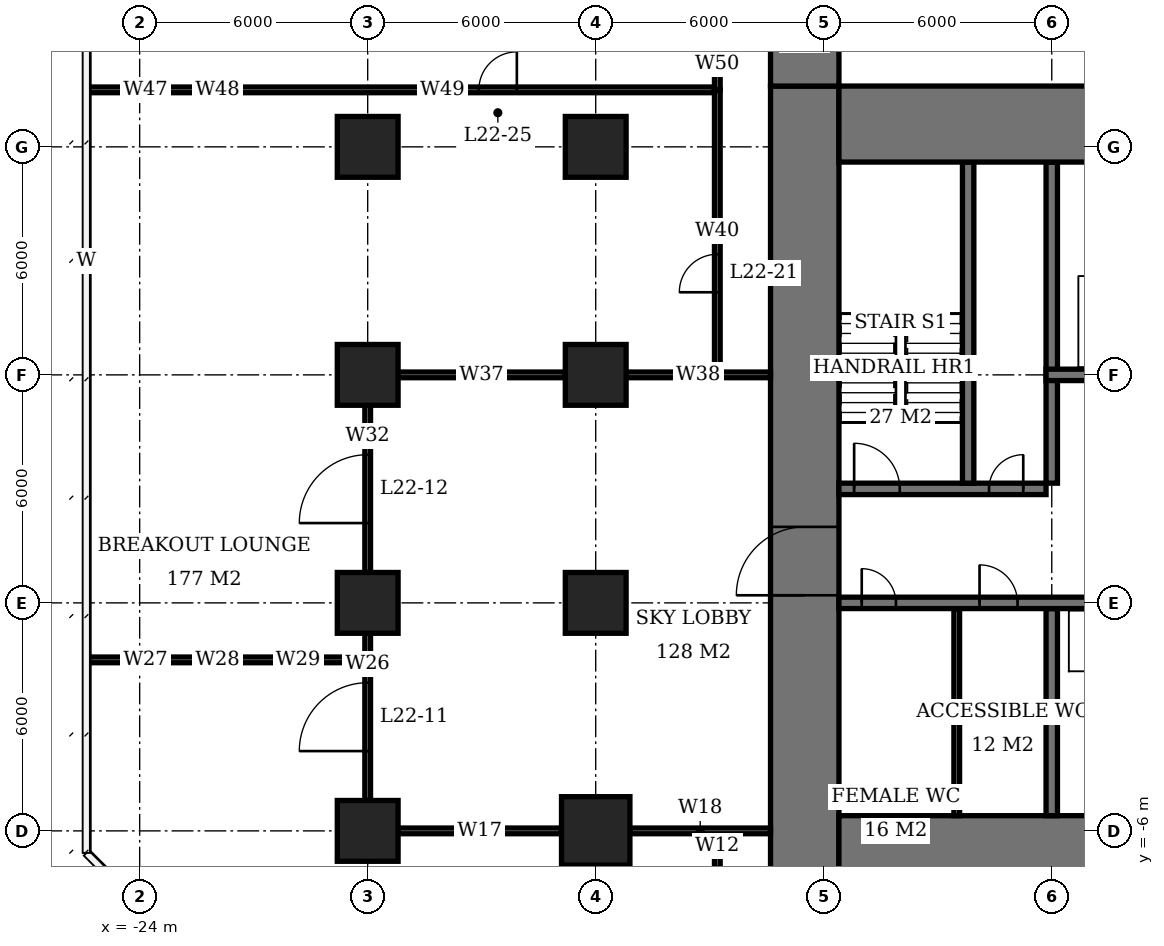
"""IFC4 building model, lengths in metres.
Left out: names, types, materials, properties, quantities, classifications, styles, units other than length and angle.
Written with IfcOpenShell. Run it as: python <this file> out.ifc"""

import sys

from ifc_helpers import new_model, si_unit, direction, frame, frame_2d, origin, origin_2d, place, context, subcontext, project, spatial, rectangle, extrude, element, fill, save


model = new_model("IFC4")
c1 = context("Model", 3, precision=1e-05, world=origin(), true_north=direction((0.0, 1.0)))
c2 = subcontext(c1, "Body", "Model", "MODEL_VIEW")
j1 = project(units=[si_unit("LENGTHUNIT", "METRE"), si_unit("PLANEANGLEUNIT", "RADIAN")], contexts=[c1])
p1 = place(None, origin())
s1 = spatial("IfcSite", under=j1, at=p1, CompositionType="ELEMENT")
p2 = place(p1, origin())
s2 = spatial("IfcBuilding", under=s1, at=p2, CompositionType="ELEMENT")
p3 = place(p2, frame((0.0, 0.0, 93.8)))
s3 = spatial("IfcBuildingStorey", under=s2, at=p3, CompositionType="ELEMENT", Elevation=93.8)
for number, where, z_axis, x_axis in (
    (1, (-18.0, -6.0, 0.0), (0.0, 0.0, 1.0), (1.0, 0.0, 0.0)),
    (2, (-18.0, 0.0, 0.0), (0.0, 0.0, 1.0), (1.0, 0.0, 0.0)),
    (3, (-18.0, 6.0, 0.0), (0.0, 0.0, 1.0), (1.0, 0.0, 0.0)),
    (4, (-18.0, 12.0, 0.0), (0.0, 0.0, 1.0), (1.0, 0.0, 0.0)),
):
    element("IfcColumn", number, at=place(p3, frame(where, z_axis=z_axis, x_axis=x_axis)), inside=s3, PredefinedType="COLUMN", context=c2, shape_type="SweptSolid", body=[
        extrude(rectangle(XDim=1.6, YDim=1.6, at=origin_2d()), origin(), (0.0, 0.0, 1.0), 3.9),
    ])
p4 = place(p3, frame((-12.0, -6.0, 0.0), z_axis=(0.0, 0.0, 1.0), x_axis=(1.0, 0.0, 0.0)))
e5 = element("IfcColumn", 5, at=p4, inside=s3, PredefinedType="COLUMN", context=c2, shape_type="SweptSolid", body=[
    extrude(rectangle(XDim=1.8, YDim=1.8, at=origin_2d()), origin(), (0.0, 0.0, 1.0), 3.9),
])
for number, where, z_axis, x_axis in (
    (6, (-12.0, 0.0, 0.0), (0.0, 0.0, 1.0), (1.0, 0.0, 0.0)),
    (7, (-12.0, 6.0, 0.0), (0.0, 0.0, 1.0), (1.0, 0.0, 0.0)),
    (8, (-12.0, 12.0, 0.0), (0.0, 0.0, 1.0), (1.0, 0.0, 0.0)),
):
    element("IfcColumn", number, at=place(p3, frame(where, z_axis=z_axis, x_axis=x_axis)), inside=s3, PredefinedType="COLUMN", context=c2, shape_type="SweptSolid", body=[
        extrude(rectangle(XDim=1.6, YDim=1.6, at=origin_2d()), origin(), (0.0, 0.0, 1.0), 3.9),
    ])
for number, where, z_axis, x_axis in (
    (9, (-5.6, -6.6, 0.0), (0.0, 0.0, 1.0), (1.0, 0.0, 0.0)),
    (10, (-5.6, 12.6, 0.0), (0.0, 0.0, 1.0), (1.0, 0.0, 0.0)),
):
    element("IfcWall", number, at=place(p3, frame(where, z_axis=z_axis, x_axis=x_axis)), inside=s3, PredefinedType="SHEAR", context=c2, shape_type="SweptSolid", body=[
        extrude(rectangle(XDim=23.2, YDim=2.0, at=frame_2d((11.6, 0.0))), origin(), (0.0, 0.0, 1.0), 3.9),
    ])
p5 = place(p3, frame((-6.5, -7.6, 0.0), z_axis=(0.0, 0.0, 1.0), x_axis=(0.0, 1.0, 0.0)))
e11 = element("IfcWall", 11, at=p5, inside=s3, PredefinedType="SHEAR", context=c2, shape_type="SweptSolid", body=[
    extrude(rectangle(XDim=21.2, YDim=1.8, at=frame_2d((10.6, 0.0))), origin(), (0.0, 0.0, 1.0), 3.9),
])
p6 = place(p5, frame((7.8, 0.0, 0.0)))
e12 = element("IfcOpeningElement", 12, at=p6, cuts=e11, PredefinedType="OPENING", context=c2, shape_type="SweptSolid", body=[
    extrude(rectangle(XDim=1.8, YDim=2.4, at=frame_2d((0.9, 1.2))), frame((0.0, 0.91, 0.0), z_axis=(0.0, -1.0, 0.0), x_axis=(1.0, 0.0, 0.0)), (0.0, 0.0, 1.0), 1.82),
])
p7 = place(p3, frame((-6.5, 13.6, 0.0), z_axis=(0.0, 0.0, 1.0), x_axis=(0.0, 1.0, 0.0)))
e13 = element("IfcWall", 13, at=p7, inside=s3, PredefinedType="SHEAR", context=c2, shape_type="SweptSolid", body=[
    extrude(rectangle(XDim=2.4, YDim=1.8, at=frame_2d((1.2, 0.0))), origin(), (0.0, 0.0, 1.0), 3.9),
])
p8 = place(p3, frame((-5.6, 0.0, 0.0), z_axis=(0.0, 0.0, 1.0), x_axis=(1.0, 0.0, 0.0)))
e14 = element("IfcWall", 14, at=p8, inside=s3, PredefinedType="SHEAR", context=c2, shape_type="SweptSolid", body=[
    extrude(rectangle(XDim=17.75, YDim=0.3, at=frame_2d((8.875, 0.0))), origin(), (0.0, 0.0, 1.0), 3.9),
])
p9 = place(p8, frame((0.6, 0.0, 0.0)))
e15 = element("IfcOpeningElement", 15, at=p9, cuts=e14, PredefinedType="OPENING", context=c2, shape_type="SweptSolid", body=[
    extrude(rectangle(XDim=0.9, YDim=2.1, at=frame_2d((0.45, 1.05))), frame((0.0, 0.16, 0.0), z_axis=(0.0, -1.0, 0.0), x_axis=(1.0, 0.0, 0.0)), (0.0, 0.0, 1.0), 0.32),
])
p10 = place(p8, frame((3.7, 0.0, 0.0)))
e16 = element("IfcOpeningElement", 16, at=p10, cuts=e14, PredefinedType="OPENING", context=c2, shape_type="SweptSolid", body=[
    extrude(rectangle(XDim=1.0, YDim=2.1, at=frame_2d((0.5, 1.05))), frame((0.0, 0.16, 0.0), z_axis=(0.0, -1.0, 0.0), x_axis=(1.0, 0.0, 0.0)), (0.0, 0.0, 1.0), 0.32),
])
p11 = place(p8, frame((6.55, 0.0, 0.0)))
e17 = element("IfcOpeningElement", 17, at=p11, cuts=e14, PredefinedType="OPENING", context=c2, shape_type="SweptSolid", body=[
    extrude(rectangle(XDim=1.1, YDim=2.1, at=frame_2d((0.55, 1.05))), frame((0.0, 0.16, 0.0), z_axis=(0.0, -1.0, 0.0), x_axis=(1.0, 0.0, 0.0)), (0.0, 0.0, 1.0), 0.32),
])
p12 = place(p8, frame((9.55, 0.0, 0.0)))
e18 = element("IfcOpeningElement", 18, at=p12, cuts=e14, PredefinedType="OPENING", context=c2, shape_type="SweptSolid", body=[
    extrude(rectangle(XDim=1.1, YDim=2.1, at=frame_2d((0.55, 1.05))), frame((0.0, 0.16, 0.0), z_axis=(0.0, -1.0, 0.0), x_axis=(1.0, 0.0, 0.0)), (0.0, 0.0, 1.0), 0.32),
])
p13 = place(p3, frame((-5.6, 3.0, 0.0), z_axis=(0.0, 0.0, 1.0), x_axis=(1.0, 0.0, 0.0)))
e19 = element("IfcWall", 19, at=p13, inside=s3, PredefinedType="SHEAR", context=c2, shape_type="SweptSolid", body=[
    extrude(rectangle(XDim=5.45, YDim=0.3, at=frame_2d((2.725, 0.0))), origin(), (0.0, 0.0, 1.0), 3.9),
])
p14 = place(p13, frame((0.4, 0.0, 0.0)))
e20 = element("IfcOpeningElement", 20, at=p14, cuts=e19, PredefinedType="OPENING", context=c2, shape_type="SweptSolid", body=[
    extrude(rectangle(XDim=1.2, YDim=2.1, at=frame_2d((0.6, 1.05))), frame((0.0, 0.16, 0.0), z_axis=(0.0, -1.0, 0.0), x_axis=(1.0, 0.0, 0.0)), (0.0, 0.0, 1.0), 0.32),
])
p15 = place(p13, frame((3.95, 0.0, 0.0)))
e21 = element("IfcOpeningElement", 21, at=p15, cuts=e19, PredefinedType="OPENING", context=c2, shape_type="SweptSolid", body=[
    extrude(rectangle(XDim=0.9, YDim=2.1, at=frame_2d((0.45, 1.05))), frame((0.0, 0.16, 0.0), z_axis=(0.0, -1.0, 0.0), x_axis=(1.0, 0.0, 0.0)), (0.0, 0.0, 1.0), 0.32),
])
p16 = place(p3, frame((-0.15, 6.0, 0.0), z_axis=(0.0, 0.0, 1.0), x_axis=(1.0, 0.0, 0.0)))
e22 = element("IfcWall", 22, at=p16, inside=s3, PredefinedType="SHEAR", context=c2, shape_type="SweptSolid", body=[
    extrude(rectangle(XDim=17.75, YDim=0.3, at=frame_2d((8.875, 0.0))), origin(), (0.0, 0.0, 1.0), 3.9),
])
p17 = place(p16, frame((13.15, 0.0, 0.0)))
e23 = element("IfcOpeningElement", 23, at=p17, cuts=e22, PredefinedType="OPENING", context=c2, shape_type="SweptSolid", body=[
    extrude(rectangle(XDim=0.9, YDim=2.1, at=frame_2d((0.45, 1.05))), frame((0.0, 0.16, 0.0), z_axis=(0.0, -1.0, 0.0), x_axis=(1.0, 0.0, 0.0)), (0.0, 0.0, 1.0), 0.32),
])
p18 = place(p16, frame((7.25, 0.0, 0.0)))
e24 = element("IfcOpeningElement", 24, at=p18, cuts=e22, PredefinedType="OPENING", context=c2, shape_type="SweptSolid", body=[
    extrude(rectangle(XDim=1.0, YDim=2.1, at=frame_2d((0.5, 1.05))), frame((0.0, 0.16, 0.0), z_axis=(0.0, -1.0, 0.0), x_axis=(1.0, 0.0, 0.0)), (0.0, 0.0, 1.0), 0.32),
])
p19 = place(p16, frame((1.1, 0.0, 0.0)))
e25 = element("IfcOpeningElement", 25, at=p19, cuts=e22, PredefinedType="OPENING", context=c2, shape_type="SweptSolid", body=[
    extrude(rectangle(XDim=1.1, YDim=2.1, at=frame_2d((0.55, 1.05))), frame((0.0, 0.16, 0.0), z_axis=(0.0, -1.0, 0.0), x_axis=(1.0, 0.0, 0.0)), (0.0, 0.0, 1.0), 0.32),
])
p20 = place(p16, frame((4.1, 0.0, 0.0)))
e26 = element("IfcOpeningElement", 26, at=p20, cuts=e22, PredefinedType="OPENING", context=c2, shape_type="SweptSolid", body=[
    extrude(rectangle(XDim=1.1, YDim=2.1, at=frame_2d((0.55, 1.05))), frame((0.0, 0.16, 0.0), z_axis=(0.0, -1.0, 0.0), x_axis=(1.0, 0.0, 0.0)), (0.0, 0.0, 1.0), 0.32),
])
p21 = place(p3, frame((0.0, -5.6, 0.0), z_axis=(0.0, 0.0, 1.0), x_axis=(0.0, 1.0, 0.0)))
e27 = element("IfcWall", 27, at=p21, inside=s3, PredefinedType="SHEAR", context=c2, shape_type="SweptSolid", body=[
    extrude(rectangle(XDim=5.45, YDim=0.3, at=frame_2d((2.725, 0.0))), origin(), (0.0, 0.0, 1.0), 3.9),
])
for number, where, z_axis, x_axis in (
    (28, (0.0, 3.15, 0.0), (0.0, 0.0, 1.0), (0.0, 1.0, 0.0)),
    (29, (-2.2, 3.15, 0.0), (0.0, 0.0, 1.0), (0.0, 1.0, 0.0)),
):
    element("IfcWall", number, at=place(p3, frame(where, z_axis=z_axis, x_axis=x_axis)), inside=s3, PredefinedType="SHEAR", context=c2, shape_type="SweptSolid", body=[
        extrude(rectangle(XDim=8.45, YDim=0.3, at=frame_2d((4.225, 0.0))), origin(), (0.0, 0.0, 1.0), 3.9),
    ])
p22 = place(p3, frame((-2.5, -5.6, 0.0), z_axis=(0.0, 0.0, 1.0), x_axis=(0.0, 1.0, 0.0)))
e30 = element("IfcWall", 30, at=p22, inside=s3, PredefinedType="PLUMBINGWALL", context=c2, shape_type="SweptSolid", body=[
    extrude(rectangle(XDim=5.45, YDim=0.15, at=frame_2d((2.725, 0.0))), origin(), (0.0, 0.0, 1.0), 3.65),
])
p23 = place(p3, frame((-17.2, -6.0, 0.0), z_axis=(0.0, 0.0, 1.0), x_axis=(1.0, 0.0, 0.0)))
e31 = element("IfcWall", 31, at=p23, inside=s3, PredefinedType="PARTITIONING", context=c2, shape_type="SweptSolid", body=[
    extrude(rectangle(XDim=4.3, YDim=0.15, at=frame_2d((2.15, 0.0))), origin(), (0.0, 0.0, 1.0), 3.65),
])
p24 = place(p3, frame((-11.1, -6.0, 0.0), z_axis=(0.0, 0.0, 1.0), x_axis=(1.0, 0.0, 0.0)))
e32 = element("IfcWall", 32, at=p24, inside=s3, PredefinedType="PARTITIONING", context=c2, shape_type="SweptSolid", body=[
    extrude(rectangle(XDim=3.7, YDim=0.15, at=frame_2d((1.85, 0.0))), origin(), (0.0, 0.0, 1.0), 3.65),
])
p25 = place(p3, frame((-17.2, 6.0, 0.0), z_axis=(0.0, 0.0, 1.0), x_axis=(1.0, 0.0, 0.0)))
e33 = element("IfcWall", 33, at=p25, inside=s3, PredefinedType="PARTITIONING", context=c2, shape_type="SweptSolid", body=[
    extrude(rectangle(XDim=4.4, YDim=0.15, at=frame_2d((2.2, 0.0))), origin(), (0.0, 0.0, 1.0), 3.65),
])
p26 = place(p3, frame((-11.2, 6.0, 0.0), z_axis=(0.0, 0.0, 1.0), x_axis=(1.0, 0.0, 0.0)))
e34 = element("IfcWall", 34, at=p26, inside=s3, PredefinedType="PARTITIONING", context=c2, shape_type="SweptSolid", body=[
    extrude(rectangle(XDim=3.8, YDim=0.15, at=frame_2d((1.9, 0.0))), origin(), (0.0, 0.0, 1.0), 3.65),
])
p27 = place(p3, frame((-18.0, -5.2, 0.0), z_axis=(0.0, 0.0, 1.0), x_axis=(0.0, 1.0, 0.0)))
e35 = element("IfcWall", 35, at=p27, inside=s3, PredefinedType="PARTITIONING", context=c2, shape_type="SweptSolid", body=[
    extrude(rectangle(XDim=4.4, YDim=0.15, at=frame_2d((2.2, 0.0))), origin(), (0.0, 0.0, 1.0), 3.65),
])
p28 = place(p27, frame((1.3, 0.0, 0.0)))
e36 = element("IfcOpeningElement", 36, at=p28, cuts=e35, PredefinedType="OPENING", context=c2, shape_type="SweptSolid", body=[
    extrude(rectangle(XDim=1.8, YDim=2.4, at=frame_2d((0.9, 1.2))), frame((0.0, 0.085, 0.0), z_axis=(0.0, -1.0, 0.0), x_axis=(1.0, 0.0, 0.0)), (0.0, 0.0, 1.0), 0.17),
])
p29 = place(p3, frame((-18.0, 0.8, 0.0), z_axis=(0.0, 0.0, 1.0), x_axis=(0.0, 1.0, 0.0)))
e37 = element("IfcWall", 37, at=p29, inside=s3, PredefinedType="PARTITIONING", context=c2, shape_type="SweptSolid", body=[
    extrude(rectangle(XDim=4.4, YDim=0.15, at=frame_2d((2.2, 0.0))), origin(), (0.0, 0.0, 1.0), 3.65),
])
p30 = place(p29, frame((1.3, 0.0, 0.0)))
e38 = element("IfcOpeningElement", 38, at=p30, cuts=e37, PredefinedType="OPENING", context=c2, shape_type="SweptSolid", body=[
    extrude(rectangle(XDim=1.8, YDim=2.4, at=frame_2d((0.9, 1.2))), frame((0.0, 0.085, 0.0), z_axis=(0.0, -1.0, 0.0), x_axis=(1.0, 0.0, 0.0)), (0.0, 0.0, 1.0), 0.17),
])
p31 = place(p3, frame((-25.375, -1.5, 0.0), z_axis=(0.0, 0.0, 1.0), x_axis=(1.0, 0.0, 0.0)))
e39 = element("IfcWall", 39, at=p31, inside=s3, PredefinedType="PARTITIONING", context=c2, shape_type="SweptSolid", body=[
    extrude(rectangle(XDim=3.065, YDim=0.15, at=frame_2d((1.532, 0.0))), origin(), (0.0, 0.0, 1.0), 3.65),
])
p32 = place(p3, frame((-22.31, -1.5, 0.0), z_axis=(0.0, 0.0, 1.0), x_axis=(1.0, 0.0, 0.0)))
e40 = element("IfcWall", 40, at=p32, inside=s3, PredefinedType="PARTITIONING", context=c2, shape_type="SweptSolid", body=[
    extrude(rectangle(XDim=0.72, YDim=0.15, at=frame_2d((0.36, 0.0))), origin(), (0.0, 0.0, 1.0), 2.65),
])
p33 = place(p3, frame((-21.59, -1.5, 0.0), z_axis=(0.0, 0.0, 1.0), x_axis=(1.0, 0.0, 0.0)))
e41 = element("IfcWall", 41, at=p33, inside=s3, PredefinedType="PARTITIONING", context=c2, shape_type="SweptSolid", body=[
    extrude(rectangle(XDim=3.515, YDim=0.15, at=frame_2d((1.758, 0.0))), origin(), (0.0, 0.0, 1.0), 3.65),
])
p34 = place(p3, frame((-25.375, 13.5, 0.0), z_axis=(0.0, 0.0, 1.0), x_axis=(1.0, 0.0, 0.0)))
e42 = element("IfcWall", 42, at=p34, inside=s3, PredefinedType="PARTITIONING", context=c2, shape_type="SweptSolid", body=[
    extrude(rectangle(XDim=3.065, YDim=0.15, at=frame_2d((1.532, 0.0))), origin(), (0.0, 0.0, 1.0), 3.65),
])
p35 = place(p3, frame((-22.31, 13.5, 0.0), z_axis=(0.0, 0.0, 1.0), x_axis=(1.0, 0.0, 0.0)))
e43 = element("IfcWall", 43, at=p35, inside=s3, PredefinedType="PARTITIONING", context=c2, shape_type="SweptSolid", body=[
    extrude(rectangle(XDim=0.72, YDim=0.15, at=frame_2d((0.36, 0.0))), origin(), (0.0, 0.0, 1.0), 2.65),
])
p36 = place(p3, frame((-21.59, 13.5, 0.0), z_axis=(0.0, 0.0, 1.0), x_axis=(1.0, 0.0, 0.0)))
e44 = element("IfcWall", 44, at=p36, inside=s3, PredefinedType="PARTITIONING", context=c2, shape_type="SweptSolid", body=[
    extrude(rectangle(XDim=12.715, YDim=0.15, at=frame_2d((6.357, 0.0))), origin(), (0.0, 0.0, 1.0), 3.65),
])
p37 = place(p36, frame((6.515, 0.0, 0.0)))
e45 = element("IfcOpeningElement", 45, at=p37, cuts=e44, PredefinedType="OPENING", context=c2, shape_type="SweptSolid", body=[
    extrude(rectangle(XDim=1.0, YDim=2.1, at=frame_2d((0.5, 1.05))), frame((0.0, 0.085, 0.0), z_axis=(0.0, -1.0, 0.0), x_axis=(1.0, 0.0, 0.0)), (0.0, 0.0, 1.0), 0.17),
])
p38 = place(p3, frame((-8.8, -8.725, 0.0), z_axis=(0.0, 0.0, 1.0), x_axis=(0.0, 1.0, 0.0)))
e46 = element("IfcWall", 46, at=p38, inside=s3, PredefinedType="PARTITIONING", context=c2, shape_type="SweptSolid", body=[
    extrude(rectangle(XDim=2.65, YDim=0.15, at=frame_2d((1.325, 0.0))), origin(), (0.0, 0.0, 1.0), 3.65),
])
p39 = place(p38, frame((0.788, 0.0, 0.0)))
e47 = element("IfcOpeningElement", 47, at=p39, cuts=e46, PredefinedType="OPENING", context=c2, shape_type="SweptSolid", body=[
    extrude(rectangle(XDim=1.0, YDim=2.1, at=frame_2d((0.5, 1.05))), frame((0.0, 0.085, 0.0), z_axis=(0.0, -1.0, 0.0), x_axis=(1.0, 0.0, 0.0)), (0.0, 0.0, 1.0), 0.17),
])
p40 = place(p3, frame((-8.8, 6.075, 0.0), z_axis=(0.0, 0.0, 1.0), x_axis=(0.0, 1.0, 0.0)))
e48 = element("IfcWall", 48, at=p40, inside=s3, PredefinedType="PARTITIONING", context=c2, shape_type="SweptSolid", body=[
    extrude(rectangle(XDim=7.425, YDim=0.15, at=frame_2d((3.712, 0.0))), origin(), (0.0, 0.0, 1.0), 3.65),
])
p41 = place(p40, frame((2.099, 0.0, 0.0)))
e49 = element("IfcOpeningElement", 49, at=p41, cuts=e48, PredefinedType="OPENING", context=c2, shape_type="SweptSolid", body=[
    extrude(rectangle(XDim=1.0, YDim=2.1, at=frame_2d((0.5, 1.05))), frame((0.0, 0.085, 0.0), z_axis=(0.0, -1.0, 0.0), x_axis=(1.0, 0.0, 0.0)), (0.0, 0.0, 1.0), 0.17),
])
p42 = place(p3, frame((-8.8, 13.5, 0.0), z_axis=(0.0, 0.0, 1.0), x_axis=(0.0, 1.0, 0.0)))
e50 = element("IfcWall", 50, at=p42, inside=s3, PredefinedType="PARTITIONING", context=c2, shape_type="SweptSolid", body=[
    extrude(rectangle(XDim=1.375, YDim=0.15, at=frame_2d((0.688, 0.0))), origin(), (0.0, 0.0, 1.0), 3.65),
])
p43 = place(p6, origin())
e51 = element("IfcDoor", 51, at=p43, inside=s3, OperationType="DOUBLE_DOOR_SINGLE_SWING", PredefinedType="DOOR", context=c2, shape_type="SweptSolid", body=[
    extrude(rectangle(XDim=1.8, YDim=2.4, at=frame_2d((0.9, 1.2))), frame((0.0, 0.025, 0.0), z_axis=(0.0, -1.0, 0.0), x_axis=(1.0, 0.0, 0.0)), (0.0, 0.0, 1.0), 0.05),
])
fill(e12, e51)
p44 = place(p14, origin())
e52 = element("IfcDoor", 52, at=p44, inside=s3, OperationType="SINGLE_SWING_LEFT", PredefinedType="DOOR", context=c2, shape_type="SweptSolid", body=[
    extrude(rectangle(XDim=1.2, YDim=2.1, at=frame_2d((0.6, 1.05))), frame((0.0, 0.025, 0.0), z_axis=(0.0, -1.0, 0.0), x_axis=(1.0, 0.0, 0.0)), (0.0, 0.0, 1.0), 0.05),
])
fill(e20, e52)
p45 = place(p15, origin())
e53 = element("IfcDoor", 53, at=p45, inside=s3, OperationType="SINGLE_SWING_RIGHT", PredefinedType="DOOR", context=c2, shape_type="SweptSolid", body=[
    extrude(rectangle(XDim=0.9, YDim=2.1, at=frame_2d((0.45, 1.05))), frame((0.0, 0.025, 0.0), z_axis=(0.0, -1.0, 0.0), x_axis=(1.0, 0.0, 0.0)), (0.0, 0.0, 1.0), 0.05),
])
fill(e21, e53)
p46 = place(p9, origin())
e54 = element("IfcDoor", 54, at=p46, inside=s3, OperationType="SINGLE_SWING_LEFT", PredefinedType="DOOR", context=c2, shape_type="SweptSolid", body=[
    extrude(rectangle(XDim=0.9, YDim=2.1, at=frame_2d((0.45, 1.05))), frame((0.0, 0.025, 0.0), z_axis=(0.0, -1.0, 0.0), x_axis=(1.0, 0.0, 0.0)), (0.0, 0.0, 1.0), 0.05),
])
fill(e15, e54)
p47 = place(p10, origin())
e55 = element("IfcDoor", 55, at=p47, inside=s3, OperationType="SINGLE_SWING_LEFT", PredefinedType="DOOR", context=c2, shape_type="SweptSolid", body=[
    extrude(rectangle(XDim=1.0, YDim=2.1, at=frame_2d((0.5, 1.05))), frame((0.0, 0.025, 0.0), z_axis=(0.0, -1.0, 0.0), x_axis=(1.0, 0.0, 0.0)), (0.0, 0.0, 1.0), 0.05),
])
fill(e16, e55)
p48 = place(p28, origin())
e56 = element("IfcDoor", 56, at=p48, inside=s3, OperationType="DOUBLE_DOOR_SINGLE_SWING", PredefinedType="DOOR", context=c2, shape_type="SweptSolid", body=[
    extrude(rectangle(XDim=1.8, YDim=2.4, at=frame_2d((0.9, 1.2))), frame((0.0, 0.025, 0.0), z_axis=(0.0, -1.0, 0.0), x_axis=(1.0, 0.0, 0.0)), (0.0, 0.0, 1.0), 0.05),
])
fill(e36, e56)
p49 = place(p30, origin())
e57 = element("IfcDoor", 57, at=p49, inside=s3, OperationType="DOUBLE_DOOR_SINGLE_SWING", PredefinedType="DOOR", context=c2, shape_type="SweptSolid", body=[
    extrude(rectangle(XDim=1.8, YDim=2.4, at=frame_2d((0.9, 1.2))), frame((0.0, 0.025, 0.0), z_axis=(0.0, -1.0, 0.0), x_axis=(1.0, 0.0, 0.0)), (0.0, 0.0, 1.0), 0.05),
])
fill(e38, e57)
p50 = place(p41, origin())
e58 = element("IfcDoor", 58, at=p50, inside=s3, OperationType="SINGLE_SWING_LEFT", PredefinedType="DOOR", context=c2, shape_type="SweptSolid", body=[
    extrude(rectangle(XDim=1.0, YDim=2.1, at=frame_2d((0.5, 1.05))), frame((0.0, 0.025, 0.0), z_axis=(0.0, -1.0, 0.0), x_axis=(1.0, 0.0, 0.0)), (0.0, 0.0, 1.0), 0.05),
])
fill(e49, e58)
p51 = place(p37, origin())
e59 = element("IfcDoor", 59, at=p51, inside=s3, OperationType="SINGLE_SWING_RIGHT", PredefinedType="DOOR", context=c2, shape_type="SweptSolid", body=[
    extrude(rectangle(XDim=1.0, YDim=2.1, at=frame_2d((0.5, 1.05))), frame((0.0, 0.025, 0.0), z_axis=(0.0, -1.0, 0.0), x_axis=(1.0, 0.0, 0.0)), (0.0, 0.0, 1.0), 0.05),
])
fill(e45, e59)
save(model, sys.argv[1])
